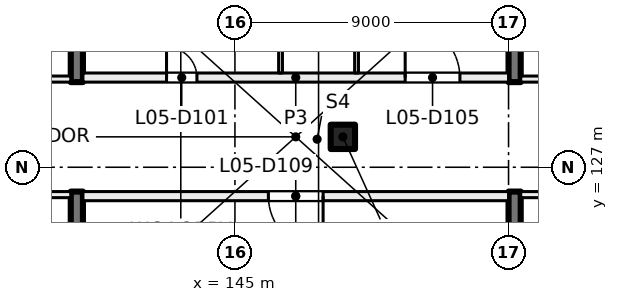
"""IFC4 building model, lengths in metres.
Left out: names, types, materials, properties, quantities, classifications, styles, units other than length and angle.
Written with IfcOpenShell. Run it as: python <this file> out.ifc"""

import sys

from ifc_helpers import new_model, si_unit, direction, frame, frame_2d, origin, origin_2d, place, context, subcontext, project, spatial, rectangle, extrude, element, fill, save


model = new_model("IFC4")
c1 = context("Model", 3, precision=1e-05, world=origin(), true_north=direction((0.0, 1.0)))
c2 = subcontext(c1, "Body", "Model", "MODEL_VIEW")
j1 = project(units=[si_unit("LENGTHUNIT", "METRE"), si_unit("PLANEANGLEUNIT", "RADIAN")], contexts=[c1])
p1 = place(None, origin())
s1 = spatial("IfcSite", under=j1, at=p1, CompositionType="ELEMENT")
p2 = place(p1, origin())
s2 = spatial("IfcBuilding", under=s1, at=p2, CompositionType="ELEMENT")
p3 = place(p2, frame((0.0, 0.0, 27.5)))
s3 = spatial("IfcBuildingStorey", under=s2, at=p3, CompositionType="ELEMENT", Elevation=27.5)
p4 = place(p3, frame((148.55, 128.0, 0.0), z_axis=(0.0, 0.0, 1.0), x_axis=(1.0, 0.0, 0.0)))
e1 = element("IfcColumn", 1, at=p4, inside=s3, PredefinedType="COLUMN", context=c2, shape_type="SweptSolid", body=[
    extrude(rectangle(XDim=0.8, YDim=0.8, at=origin_2d()), origin(), (0.0, 0.0, 1.0), 4.0),
])
for number, where, z_axis, x_axis in (
    (2, (139.8, 117.6, 0.0), (0.0, 0.0, 1.0), (0.0, 1.0, 0.0)),
    (3, (139.8, 129.8, 0.0), (0.0, 0.0, 1.0), (0.0, 1.0, 0.0)),
    (4, (154.2, 138.4, 0.0), (0.0, 0.0, 1.0), (0.0, -1.0, 0.0)),
    (5, (154.2, 126.2, 0.0), (0.0, 0.0, 1.0), (0.0, -1.0, 0.0)),
):
    element("IfcWall", number, at=place(p3, frame(where, z_axis=z_axis, x_axis=x_axis)), inside=s3, PredefinedType="SHEAR", context=c2, shape_type="SweptSolid", body=[
        extrude(rectangle(XDim=8.6, YDim=0.4, at=frame_2d((4.3, 0.0))), origin(), (0.0, 0.0, 1.0), 4.0),
    ])
p5 = place(p3, frame((135.0, 129.9, 0.0), z_axis=(0.0, 0.0, 1.0), x_axis=(1.0, 0.0, 0.0)))
e6 = element("IfcWall", 6, at=p5, inside=s3, PredefinedType="PARTITIONING", context=c2, shape_type="SweptSolid", body=[
    extrude(rectangle(XDim=4.6, YDim=0.2, at=frame_2d((2.3, 0.0))), origin(), (0.0, 0.0, 1.0), 3.625),
])
p6 = place(p5, frame((1.7, 0.0, 0.0)))
e7 = element("IfcOpeningElement", 7, at=p6, cuts=e6, PredefinedType="OPENING", context=c2, shape_type="SweptSolid", body=[
    extrude(rectangle(XDim=1.2, YDim=2.1, at=frame_2d((0.6, 1.05))), frame((0.0, 0.11, 0.0), z_axis=(0.0, -1.0, 0.0), x_axis=(1.0, 0.0, 0.0)), (0.0, 0.0, 1.0), 0.22),
])
p7 = place(p3, frame((139.6, 126.1, 0.0), z_axis=(0.0, 0.0, 1.0), x_axis=(-1.0, 0.0, 0.0)))
e8 = element("IfcWall", 8, at=p7, inside=s3, PredefinedType="PARTITIONING", context=c2, shape_type="SweptSolid", body=[
    extrude(rectangle(XDim=4.6, YDim=0.2, at=frame_2d((2.3, 0.0))), origin(), (0.0, 0.0, 1.0), 3.625),
])
p8 = place(p7, frame((1.7, 0.0, 0.0)))
e9 = element("IfcOpeningElement", 9, at=p8, cuts=e8, PredefinedType="OPENING", context=c2, shape_type="SweptSolid", body=[
    extrude(rectangle(XDim=1.2, YDim=2.1, at=frame_2d((0.6, 1.05))), frame((0.0, 0.11, 0.0), z_axis=(0.0, -1.0, 0.0), x_axis=(1.0, 0.0, 0.0)), (0.0, 0.0, 1.0), 0.22),
])
p9 = place(p3, frame((163.8, 126.1, 0.0), z_axis=(0.0, 0.0, 1.0), x_axis=(-1.0, 0.0, 0.0)))
e10 = element("IfcWall", 10, at=p9, inside=s3, PredefinedType="PARTITIONING", context=c2, shape_type="SweptSolid", body=[
    extrude(rectangle(XDim=9.4, YDim=0.2, at=frame_2d((4.7, 0.0))), origin(), (0.0, 0.0, 1.0), 3.625),
])
p10 = place(p9, frame((4.1, 0.0, 0.0)))
e11 = element("IfcOpeningElement", 11, at=p10, cuts=e10, PredefinedType="OPENING", context=c2, shape_type="SweptSolid", body=[
    extrude(rectangle(XDim=1.2, YDim=2.1, at=frame_2d((0.6, 1.05))), frame((0.0, 0.11, 0.0), z_axis=(0.0, -1.0, 0.0), x_axis=(1.0, 0.0, 0.0)), (0.0, 0.0, 1.0), 0.22),
])
p11 = place(p3, frame((154.4, 129.9, 0.0), z_axis=(0.0, 0.0, 1.0), x_axis=(1.0, 0.0, 0.0)))
e12 = element("IfcWall", 12, at=p11, inside=s3, PredefinedType="PARTITIONING", context=c2, shape_type="SweptSolid", body=[
    extrude(rectangle(XDim=9.4, YDim=0.2, at=frame_2d((4.7, 0.0))), origin(), (0.0, 0.0, 1.0), 3.625),
])
p12 = place(p11, frame((4.1, 0.0, 0.0)))
e13 = element("IfcOpeningElement", 13, at=p12, cuts=e12, PredefinedType="OPENING", context=c2, shape_type="SweptSolid", body=[
    extrude(rectangle(XDim=1.2, YDim=2.1, at=frame_2d((0.6, 1.05))), frame((0.0, 0.11, 0.0), z_axis=(0.0, -1.0, 0.0), x_axis=(1.0, 0.0, 0.0)), (0.0, 0.0, 1.0), 0.22),
])
p13 = place(p3, frame((140.0, 129.95, 0.0), z_axis=(0.0, 0.0, 1.0), x_axis=(1.0, 0.0, 0.0)))
e14 = element("IfcWall", 14, at=p13, inside=s3, PredefinedType="PARTITIONING", context=c2, shape_type="SweptSolid", body=[
    extrude(rectangle(XDim=14.0, YDim=0.3, at=frame_2d((7.0, 0.0))), origin(), (0.0, 0.0, 1.0), 3.625),
])
p14 = place(p13, frame((2.75, 0.0, 0.0)))
e15 = element("IfcOpeningElement", 15, at=p14, cuts=e14, PredefinedType="OPENING", context=c2, shape_type="SweptSolid", body=[
    extrude(rectangle(XDim=1.0, YDim=2.1, at=frame_2d((0.5, 1.05))), frame((0.0, 0.16, 0.0), z_axis=(0.0, -1.0, 0.0), x_axis=(1.0, 0.0, 0.0)), (0.0, 0.0, 1.0), 0.32),
])
p15 = place(p13, frame((10.6, 0.0, 0.0)))
e16 = element("IfcOpeningElement", 16, at=p15, cuts=e14, PredefinedType="OPENING", context=c2, shape_type="SweptSolid", body=[
    extrude(rectangle(XDim=1.8, YDim=2.1, at=frame_2d((0.9, 1.05))), frame((0.0, 0.16, 0.0), z_axis=(0.0, -1.0, 0.0), x_axis=(1.0, 0.0, 0.0)), (0.0, 0.0, 1.0), 0.32),
])
p16 = place(p3, frame((146.5, 132.688, 0.0), z_axis=(0.0, 0.0, 1.0), x_axis=(0.0, -1.0, 0.0)))
e17 = element("IfcWall", 17, at=p16, inside=s3, PredefinedType="PARTITIONING", context=c2, shape_type="SweptSolid", body=[
    extrude(rectangle(XDim=2.588, YDim=0.125, at=frame_2d((1.294, 0.0))), origin(), (0.0, 0.0, 1.0), 3.625),
])
p17 = place(p16, frame((0.794, 0.0, 0.0)))
e18 = element("IfcOpeningElement", 18, at=p17, cuts=e17, PredefinedType="OPENING", context=c2, shape_type="SweptSolid", body=[
    extrude(rectangle(XDim=1.0, YDim=2.1, at=frame_2d((0.5, 1.05))), frame((0.0, 0.073, 0.0), z_axis=(0.0, -1.0, 0.0), x_axis=(1.0, 0.0, 0.0)), (0.0, 0.0, 1.0), 0.145),
])
p18 = place(p3, frame((149.0, 139.012, 0.0), z_axis=(0.0, 0.0, 1.0), x_axis=(0.0, -1.0, 0.0)))
e19 = element("IfcWall", 19, at=p18, inside=s3, PredefinedType="PARTITIONING", context=c2, shape_type="SweptSolid", body=[
    extrude(rectangle(XDim=8.912, YDim=0.125, at=frame_2d((4.456, 0.0))), origin(), (0.0, 0.0, 1.0), 3.625),
])
p19 = place(p3, frame((154.0, 126.05, 0.0), z_axis=(0.0, 0.0, 1.0), x_axis=(-1.0, 0.0, 0.0)))
e20 = element("IfcWall", 20, at=p19, inside=s3, PredefinedType="PARTITIONING", context=c2, shape_type="SweptSolid", body=[
    extrude(rectangle(XDim=14.0, YDim=0.3, at=frame_2d((7.0, 0.0))), origin(), (0.0, 0.0, 1.0), 3.625),
])
p20 = place(p19, frame((6.1, 0.0, 0.0)))
e21 = element("IfcOpeningElement", 21, at=p20, cuts=e20, PredefinedType="OPENING", context=c2, shape_type="SweptSolid", body=[
    extrude(rectangle(XDim=1.8, YDim=2.1, at=frame_2d((0.9, 1.05))), frame((0.0, 0.16, 0.0), z_axis=(0.0, -1.0, 0.0), x_axis=(1.0, 0.0, 0.0)), (0.0, 0.0, 1.0), 0.32),
])
p21 = place(p14, origin())
e22 = element("IfcDoor", 22, at=p21, inside=s3, OperationType="SINGLE_SWING_LEFT", PredefinedType="DOOR", context=c2, shape_type="SweptSolid", body=[
    extrude(rectangle(XDim=1.0, YDim=2.1, at=frame_2d((0.5, 1.05))), frame((0.0, 0.025, 0.0), z_axis=(0.0, -1.0, 0.0), x_axis=(1.0, 0.0, 0.0)), (0.0, 0.0, 1.0), 0.05),
])
fill(e15, e22)
p22 = place(p15, origin())
e23 = element("IfcDoor", 23, at=p22, inside=s3, OperationType="DOUBLE_DOOR_SINGLE_SWING", PredefinedType="DOOR", context=c2, shape_type="SweptSolid", body=[
    extrude(rectangle(XDim=1.8, YDim=2.1, at=frame_2d((0.9, 1.05))), frame((0.0, 0.025, 0.0), z_axis=(0.0, -1.0, 0.0), x_axis=(1.0, 0.0, 0.0)), (0.0, 0.0, 1.0), 0.05),
])
fill(e16, e23)
p23 = place(p20, origin())
e24 = element("IfcDoor", 24, at=p23, inside=s3, OperationType="DOUBLE_DOOR_SINGLE_SWING", PredefinedType="DOOR", context=c2, shape_type="SweptSolid", body=[
    extrude(rectangle(XDim=1.8, YDim=2.1, at=frame_2d((0.9, 1.05))), frame((0.0, 0.025, 0.0), z_axis=(0.0, -1.0, 0.0), x_axis=(1.0, 0.0, 0.0)), (0.0, 0.0, 1.0), 0.05),
])
fill(e21, e24)
save(model, sys.argv[1])
